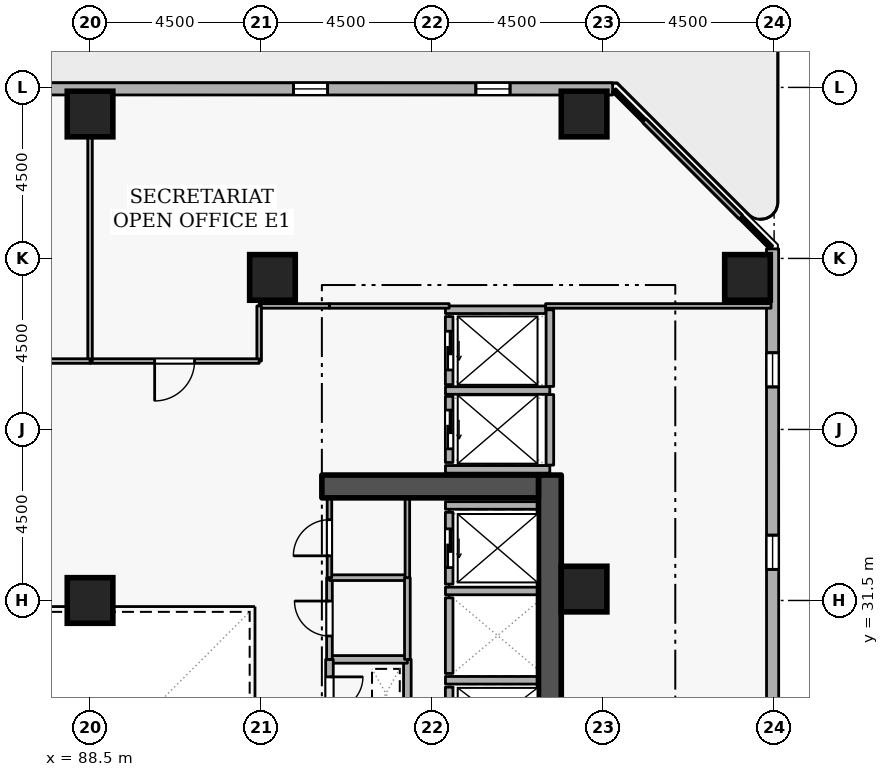
"""IFC4 building model, lengths in metres.
Left out: names, types, materials, properties, quantities, classifications, styles, units other than length and angle.
Written with IfcOpenShell. Run it as: python <this file> out.ifc"""

import sys

from ifc_helpers import new_model, si_unit, direction, frame, frame_2d, origin, origin_2d, place, context, subcontext, project, spatial, rectangle, extrude, element, fill, save


model = new_model("IFC4")
c1 = context("Model", 3, precision=1e-05, world=origin(), true_north=direction((0.0, 1.0)))
c2 = subcontext(c1, "Body", "Model", "MODEL_VIEW")
j1 = project(units=[si_unit("LENGTHUNIT", "METRE"), si_unit("PLANEANGLEUNIT", "RADIAN")], contexts=[c1])
p1 = place(None, origin())
s1 = spatial("IfcSite", under=j1, at=p1, CompositionType="ELEMENT")
p2 = place(p1, origin())
s2 = spatial("IfcBuilding", under=s1, at=p2, CompositionType="ELEMENT")
p3 = place(p2, frame((0.0, 0.0, 98.1)))
s3 = spatial("IfcBuildingStorey", under=s2, at=p3, CompositionType="ELEMENT", Elevation=98.1)
p4 = place(p3, frame((100.6, 19.2, 0.0), z_axis=(0.0, 0.0, 1.0), x_axis=(0.0, 1.0, 0.0)))
e1 = element("IfcWall", 1, at=p4, inside=s3, PredefinedType="SHEAR", context=c2, shape_type="SweptSolid", body=[
    extrude(rectangle(XDim=15.6, YDim=0.6, at=frame_2d((7.8, 0.0))), origin(), (0.0, 0.0, 1.0), 3.6),
])
p5 = place(p3, frame((94.6, 34.5, 0.0), z_axis=(0.0, 0.0, 1.0), x_axis=(1.0, 0.0, 0.0)))
e2 = element("IfcWall", 2, at=p5, inside=s3, PredefinedType="SHEAR", context=c2, shape_type="SweptSolid", body=[
    extrude(rectangle(XDim=5.7, YDim=0.6, at=frame_2d((2.85, 0.0))), origin(), (0.0, 0.0, 1.0), 3.6),
])
for number, where, z_axis, x_axis in (
    (3, (105.8, 40.0, 0.0), (0.0, 0.0, 1.0), (1.0, 0.0, 0.0)),
    (4, (101.5, 44.3, 0.0), (0.0, 0.0, 1.0), (1.0, 0.0, 0.0)),
    (5, (88.5, 44.3, 0.0), (0.0, 0.0, 1.0), (1.0, 0.0, 0.0)),
    (6, (93.3, 40.0, 0.0), (0.0, 0.0, 1.0), (1.0, 0.0, 0.0)),
    (7, (101.5, 31.8, 0.0), (0.0, 0.0, 1.0), (1.0, 0.0, 0.0)),
    (8, (88.5, 31.5, 0.0), (0.0, 0.0, 1.0), (1.0, 0.0, 0.0)),
):
    element("IfcColumn", number, at=place(p3, frame(where, z_axis=z_axis, x_axis=x_axis)), inside=s3, PredefinedType="COLUMN", context=c2, shape_type="SweptSolid", body=[
        extrude(rectangle(XDim=1.2, YDim=1.2, at=origin_2d()), origin(), (0.0, 0.0, 1.0), 3.6),
    ])
p6 = place(p3, frame((106.465, 5.619, 0.0), z_axis=(0.0, 0.0, 1.0), x_axis=(-0.000145929605, 0.999999989352, 0.0)))
e9 = element("IfcWall", 9, at=p6, inside=s3, PredefinedType="STANDARD", context=c2, shape_type="SweptSolid", body=[
    extrude(rectangle(XDim=35.133, YDim=0.32, at=frame_2d((17.566, 0.0))), origin(), (0.0, 0.0, 1.0), 2.7),
])
p7 = place(p6, frame((2.7, 0.0, 0.72)))
e10 = element("IfcOpeningElement", 10, at=p7, cuts=e9, PredefinedType="OPENING", context=c2, shape_type="SweptSolid", body=[
    extrude(rectangle(XDim=0.9, YDim=1.75, at=frame_2d((0.45, 0.875))), frame((0.0, 0.17, 0.0), z_axis=(0.0, -1.0, 0.0), x_axis=(1.0, 0.0, 0.0)), (0.0, 0.0, 1.0), 0.34),
])
p8 = place(p6, frame((12.3, 0.0, 0.72)))
e11 = element("IfcOpeningElement", 11, at=p8, cuts=e9, PredefinedType="OPENING", context=c2, shape_type="SweptSolid", body=[
    extrude(rectangle(XDim=0.9, YDim=1.75, at=frame_2d((0.45, 0.875))), frame((0.0, 0.17, 0.0), z_axis=(0.0, -1.0, 0.0), x_axis=(1.0, 0.0, 0.0)), (0.0, 0.0, 1.0), 0.34),
])
p9 = place(p6, frame((17.1, 0.0, 0.72)))
e12 = element("IfcOpeningElement", 12, at=p9, cuts=e9, PredefinedType="OPENING", context=c2, shape_type="SweptSolid", body=[
    extrude(rectangle(XDim=0.9, YDim=1.75, at=frame_2d((0.45, 0.875))), frame((0.0, 0.17, 0.0), z_axis=(0.0, -1.0, 0.0), x_axis=(1.0, 0.0, 0.0)), (0.0, 0.0, 1.0), 0.34),
])
p10 = place(p6, frame((26.7, 0.0, 0.72)))
e13 = element("IfcOpeningElement", 13, at=p10, cuts=e9, PredefinedType="OPENING", context=c2, shape_type="SweptSolid", body=[
    extrude(rectangle(XDim=0.9, YDim=1.75, at=frame_2d((0.45, 0.875))), frame((0.0, 0.17, 0.0), z_axis=(0.0, -1.0, 0.0), x_axis=(1.0, 0.0, 0.0)), (0.0, 0.0, 1.0), 0.34),
])
p11 = place(p6, frame((31.5, 0.0, 0.72)))
e14 = element("IfcOpeningElement", 14, at=p11, cuts=e9, PredefinedType="OPENING", context=c2, shape_type="SweptSolid", body=[
    extrude(rectangle(XDim=0.9, YDim=1.75, at=frame_2d((0.45, 0.875))), frame((0.0, 0.17, 0.0), z_axis=(0.0, -1.0, 0.0), x_axis=(1.0, 0.0, 0.0)), (0.0, 0.0, 1.0), 0.34),
])
p12 = place(p3, frame((102.252, 44.959, 0.0), z_axis=(0.0, 0.0, 1.0), x_axis=(-0.999999989352, 0.000145929605, 0.0)))
e15 = element("IfcWall", 15, at=p12, inside=s3, PredefinedType="STANDARD", context=c2, shape_type="SweptSolid", body=[
    extrude(rectangle(XDim=35.133, YDim=0.32, at=frame_2d((17.566, 0.0))), origin(), (0.0, 0.0, 1.0), 2.7),
])
p13 = place(p12, frame((19.292, 0.0, 0.0)))
e16 = element("IfcOpeningElement", 16, at=p13, cuts=e15, PredefinedType="OPENING", context=c2, shape_type="SweptSolid", body=[
    extrude(rectangle(XDim=1.15, YDim=2.1, at=frame_2d((0.575, 1.05))), frame((0.0, 0.17, 0.0), z_axis=(0.0, -1.0, 0.0), x_axis=(1.0, 0.0, 0.0)), (0.0, 0.0, 1.0), 0.34),
])
p14 = place(p12, frame((2.7, 0.0, 0.72)))
e17 = element("IfcOpeningElement", 17, at=p14, cuts=e15, PredefinedType="OPENING", context=c2, shape_type="SweptSolid", body=[
    extrude(rectangle(XDim=0.9, YDim=1.75, at=frame_2d((0.45, 0.875))), frame((0.0, 0.17, 0.0), z_axis=(0.0, -1.0, 0.0), x_axis=(1.0, 0.0, 0.0)), (0.0, 0.0, 1.0), 0.34),
])
p15 = place(p12, frame((7.5, 0.0, 0.72)))
e18 = element("IfcOpeningElement", 18, at=p15, cuts=e15, PredefinedType="OPENING", context=c2, shape_type="SweptSolid", body=[
    extrude(rectangle(XDim=0.9, YDim=1.75, at=frame_2d((0.45, 0.875))), frame((0.0, 0.17, 0.0), z_axis=(0.0, -1.0, 0.0), x_axis=(1.0, 0.0, 0.0)), (0.0, 0.0, 1.0), 0.34),
])
p16 = place(p12, frame((17.1, 0.0, 0.72)))
e19 = element("IfcOpeningElement", 19, at=p16, cuts=e15, PredefinedType="OPENING", context=c2, shape_type="SweptSolid", body=[
    extrude(rectangle(XDim=0.9, YDim=1.75, at=frame_2d((0.45, 0.875))), frame((0.0, 0.17, 0.0), z_axis=(0.0, -1.0, 0.0), x_axis=(1.0, 0.0, 0.0)), (0.0, 0.0, 1.0), 0.34),
])
p17 = place(p12, frame((21.9, 0.0, 0.72)))
e20 = element("IfcOpeningElement", 20, at=p17, cuts=e15, PredefinedType="OPENING", context=c2, shape_type="SweptSolid", body=[
    extrude(rectangle(XDim=0.9, YDim=1.75, at=frame_2d((0.45, 0.875))), frame((0.0, 0.17, 0.0), z_axis=(0.0, -1.0, 0.0), x_axis=(1.0, 0.0, 0.0)), (0.0, 0.0, 1.0), 0.34),
])
p18 = place(p12, frame((31.5, 0.0, 0.72)))
e21 = element("IfcOpeningElement", 21, at=p18, cuts=e15, PredefinedType="OPENING", context=c2, shape_type="SweptSolid", body=[
    extrude(rectangle(XDim=0.9, YDim=1.75, at=frame_2d((0.45, 0.875))), frame((0.0, 0.17, 0.0), z_axis=(0.0, -1.0, 0.0), x_axis=(1.0, 0.0, 0.0)), (0.0, 0.0, 1.0), 0.34),
])
p19 = place(p3, frame((97.95, 29.22, 0.0), z_axis=(0.0, 0.0, 1.0), x_axis=(0.0, -1.0, 0.0)))
e22 = element("IfcWall", 22, at=p19, inside=s3, PredefinedType="STANDARD", context=c2, shape_type="SweptSolid", body=[
    extrude(rectangle(XDim=1.64, YDim=0.2, at=frame_2d((0.82, 0.0))), origin(), (0.0, 0.0, 1.0), 3.3),
])
p20 = place(p19, frame((0.31, 0.0, 0.0)))
e23 = element("IfcOpeningElement", 23, at=p20, cuts=e22, PredefinedType="OPENING", context=c2, shape_type="SweptSolid", body=[
    extrude(rectangle(XDim=1.02, YDim=2.06, at=frame_2d((0.51, 1.03))), frame((0.0, 0.11, 0.0), z_axis=(0.0, -1.0, 0.0), x_axis=(1.0, 0.0, 0.0)), (0.0, 0.0, 1.0), 0.22),
])
p21 = place(p3, frame((97.95, 31.57, 0.0), z_axis=(0.0, 0.0, 1.0), x_axis=(0.0, -1.0, 0.0)))
e24 = element("IfcWall", 24, at=p21, inside=s3, PredefinedType="STANDARD", context=c2, shape_type="SweptSolid", body=[
    extrude(rectangle(XDim=1.99, YDim=0.2, at=frame_2d((0.995, 0.0))), origin(), (0.0, 0.0, 1.0), 3.3),
])
p22 = place(p3, frame((97.95, 33.82, 0.0), z_axis=(0.0, 0.0, 1.0), x_axis=(0.0, -1.0, 0.0)))
e25 = element("IfcWall", 25, at=p22, inside=s3, PredefinedType="STANDARD", context=c2, shape_type="SweptSolid", body=[
    extrude(rectangle(XDim=1.89, YDim=0.2, at=frame_2d((0.945, 0.0))), origin(), (0.0, 0.0, 1.0), 3.3),
])
p23 = place(p22, frame((0.435, 0.0, 0.0)))
e26 = element("IfcOpeningElement", 26, at=p23, cuts=e25, PredefinedType="OPENING", context=c2, shape_type="SweptSolid", body=[
    extrude(rectangle(XDim=1.02, YDim=2.06, at=frame_2d((0.51, 1.03))), frame((0.0, 0.11, 0.0), z_axis=(0.0, -1.0, 0.0), x_axis=(1.0, 0.0, 0.0)), (0.0, 0.0, 1.0), 0.22),
])
p24 = place(p3, frame((97.95, 36.87, 0.0), z_axis=(0.0, 0.0, 1.0), x_axis=(0.0, -1.0, 0.0)))
e27 = element("IfcWall", 27, at=p24, inside=s3, PredefinedType="STANDARD", context=c2, shape_type="SweptSolid", body=[
    extrude(rectangle(XDim=1.74, YDim=0.2, at=frame_2d((0.87, 0.0))), origin(), (0.0, 0.0, 1.0), 3.3),
])
p25 = place(p24, frame((0.36, 0.0, 0.0)))
e28 = element("IfcOpeningElement", 28, at=p25, cuts=e27, PredefinedType="OPENING", context=c2, shape_type="SweptSolid", body=[
    extrude(rectangle(XDim=1.02, YDim=2.06, at=frame_2d((0.51, 1.03))), frame((0.0, 0.11, 0.0), z_axis=(0.0, -1.0, 0.0), x_axis=(1.0, 0.0, 0.0)), (0.0, 0.0, 1.0), 0.22),
])
p26 = place(p3, frame((97.95, 38.97, 0.0), z_axis=(0.0, 0.0, 1.0), x_axis=(0.0, -1.0, 0.0)))
e29 = element("IfcWall", 29, at=p26, inside=s3, PredefinedType="STANDARD", context=c2, shape_type="SweptSolid", body=[
    extrude(rectangle(XDim=1.79, YDim=0.2, at=frame_2d((0.895, 0.0))), origin(), (0.0, 0.0, 1.0), 3.3),
])
p27 = place(p26, frame((0.385, 0.0, 0.0)))
e30 = element("IfcOpeningElement", 30, at=p27, cuts=e29, PredefinedType="OPENING", context=c2, shape_type="SweptSolid", body=[
    extrude(rectangle(XDim=1.02, YDim=2.06, at=frame_2d((0.51, 1.03))), frame((0.0, 0.11, 0.0), z_axis=(0.0, -1.0, 0.0), x_axis=(1.0, 0.0, 0.0)), (0.0, 0.0, 1.0), 0.22),
])
for number, where, z_axis, x_axis in (
    (31, (97.852, 29.4, 0.0), (0.0, 0.0, 1.0), (1.0, 0.0, 0.0)),
    (32, (97.852, 31.75, 0.0), (0.0, 0.0, 1.0), (1.0, 0.0, 0.0)),
    (33, (97.852, 34.0, 0.0), (0.0, 0.0, 1.0), (1.0, 0.0, 0.0)),
):
    element("IfcWall", number, at=place(p3, frame(where, z_axis=z_axis, x_axis=x_axis)), inside=s3, PredefinedType="STANDARD", context=c2, shape_type="SweptSolid", body=[
        extrude(rectangle(XDim=2.436, YDim=0.2, at=frame_2d((1.218, 0.0))), origin(), (0.0, 0.0, 1.0), 3.3),
    ])
for number, where, z_axis, x_axis in (
    (34, (97.852, 37.025, 0.0), (0.0, 0.0, 1.0), (1.0, 0.0, 0.0)),
    (35, (97.852, 34.95, 0.0), (0.0, 0.0, 1.0), (1.0, 0.0, 0.0)),
):
    element("IfcWall", number, at=place(p3, frame(where, z_axis=z_axis, x_axis=x_axis)), inside=s3, PredefinedType="STANDARD", context=c2, shape_type="SweptSolid", body=[
        extrude(rectangle(XDim=2.746, YDim=0.2, at=frame_2d((1.373, 0.0))), origin(), (0.0, 0.0, 1.0), 3.3),
    ])
p28 = place(p3, frame((100.6, 35.062, 0.0), z_axis=(0.0, 0.0, 1.0), x_axis=(0.0, 1.0, 0.0)))
e36 = element("IfcWall", 36, at=p28, inside=s3, PredefinedType="STANDARD", context=c2, shape_type="SweptSolid", body=[
    extrude(rectangle(XDim=1.856, YDim=0.2, at=frame_2d((0.928, 0.0))), origin(), (0.0, 0.0, 1.0), 3.3),
])
p29 = place(p3, frame((100.6, 37.132, 0.0), z_axis=(0.0, 0.0, 1.0), x_axis=(0.0, 1.0, 0.0)))
e37 = element("IfcWall", 37, at=p29, inside=s3, PredefinedType="STANDARD", context=c2, shape_type="SweptSolid", body=[
    extrude(rectangle(XDim=2.016, YDim=0.2, at=frame_2d((1.008, 0.0))), origin(), (0.0, 0.0, 1.0), 3.3),
])
p30 = place(p3, frame((97.852, 39.15, 0.0), z_axis=(0.0, 0.0, 1.0), x_axis=(1.0, 0.0, 0.0)))
e38 = element("IfcWall", 38, at=p30, inside=s3, PredefinedType="STANDARD", context=c2, shape_type="SweptSolid", body=[
    extrude(rectangle(XDim=2.636, YDim=0.2, at=frame_2d((1.318, 0.0))), origin(), (0.0, 0.0, 1.0), 3.3),
])
p31 = place(p3, frame((96.85, 28.15, 0.0), z_axis=(0.0, 0.0, 1.0), x_axis=(0.0, 1.0, 0.0)))
e39 = element("IfcWall", 39, at=p31, inside=s3, PredefinedType="STANDARD", context=c2, shape_type="SweptSolid", body=[
    extrude(rectangle(XDim=1.8, YDim=0.2, at=frame_2d((0.9, 0.0))), origin(), (0.0, 0.0, 1.0), 3.3),
])
p32 = place(p3, frame((96.85, 29.95, 0.0), z_axis=(0.0, 0.0, 1.0), x_axis=(-1.0, 0.0, 0.0)))
e40 = element("IfcWall", 40, at=p32, inside=s3, PredefinedType="STANDARD", context=c2, shape_type="SweptSolid", body=[
    extrude(rectangle(XDim=2.05, YDim=0.2, at=frame_2d((1.025, 0.0))), origin(), (0.0, 0.0, 1.0), 3.3),
])
p33 = place(p3, frame((94.8, 29.95, 0.0), z_axis=(0.0, 0.0, 1.0), x_axis=(0.0, -1.0, 0.0)))
e41 = element("IfcWall", 41, at=p33, inside=s3, PredefinedType="STANDARD", context=c2, shape_type="SweptSolid", body=[
    extrude(rectangle(XDim=1.8, YDim=0.2, at=frame_2d((0.9, 0.0))), origin(), (0.0, 0.0, 1.0), 3.3),
])
p34 = place(p33, frame((0.46, 0.0, 0.0)))
e42 = element("IfcOpeningElement", 42, at=p34, cuts=e41, PredefinedType="OPENING", context=c2, shape_type="SweptSolid", body=[
    extrude(rectangle(XDim=0.88, YDim=2.04, at=frame_2d((0.44, 1.02))), frame((0.0, 0.11, 0.0), z_axis=(0.0, -1.0, 0.0), x_axis=(1.0, 0.0, 0.0)), (0.0, 0.0, 1.0), 0.22),
])
p35 = place(p3, frame((94.8, 29.95, 0.0), z_axis=(0.0, 0.0, 1.0), x_axis=(0.0, 1.0, 0.0)))
e43 = element("IfcWall", 43, at=p35, inside=s3, PredefinedType="PARTITIONING", context=c2, shape_type="SweptSolid", body=[
    extrude(rectangle(XDim=2.15, YDim=0.15, at=frame_2d((1.075, 0.0))), origin(), (0.0, 0.0, 1.0), 3.3),
])
p36 = place(p35, frame((0.615, 0.0, 0.0)))
e44 = element("IfcOpeningElement", 44, at=p36, cuts=e43, PredefinedType="OPENING", context=c2, shape_type="SweptSolid", body=[
    extrude(rectangle(XDim=0.92, YDim=2.08, at=frame_2d((0.46, 1.04))), frame((0.0, 0.085, 0.0), z_axis=(0.0, -1.0, 0.0), x_axis=(1.0, 0.0, 0.0)), (0.0, 0.0, 1.0), 0.17),
])
p37 = place(p3, frame((94.8, 32.1, 0.0), z_axis=(0.0, 0.0, 1.0), x_axis=(1.0, 0.0, 0.0)))
e45 = element("IfcWall", 45, at=p37, inside=s3, PredefinedType="PARTITIONING", context=c2, shape_type="SweptSolid", body=[
    extrude(rectangle(XDim=2.05, YDim=0.15, at=frame_2d((1.025, 0.0))), origin(), (0.0, 0.0, 1.0), 3.3),
])
p38 = place(p3, frame((96.85, 32.1, 0.0), z_axis=(0.0, 0.0, 1.0), x_axis=(0.0, -1.0, 0.0)))
e46 = element("IfcWall", 46, at=p38, inside=s3, PredefinedType="PARTITIONING", context=c2, shape_type="SweptSolid", body=[
    extrude(rectangle(XDim=2.15, YDim=0.15, at=frame_2d((1.075, 0.0))), origin(), (0.0, 0.0, 1.0), 3.3),
])
p39 = place(p3, frame((94.8, 32.1, 0.0), z_axis=(0.0, 0.0, 1.0), x_axis=(0.0, 1.0, 0.0)))
e47 = element("IfcWall", 47, at=p39, inside=s3, PredefinedType="PARTITIONING", context=c2, shape_type="SweptSolid", body=[
    extrude(rectangle(XDim=2.1, YDim=0.12, at=frame_2d((1.05, 0.0))), origin(), (0.0, 0.0, 1.0), 3.3),
])
p40 = place(p39, frame((0.575, 0.0, 0.0)))
e48 = element("IfcOpeningElement", 48, at=p40, cuts=e47, PredefinedType="OPENING", context=c2, shape_type="SweptSolid", body=[
    extrude(rectangle(XDim=0.95, YDim=2.1, at=frame_2d((0.475, 1.05))), frame((0.0, 0.07, 0.0), z_axis=(0.0, -1.0, 0.0), x_axis=(1.0, 0.0, 0.0)), (0.0, 0.0, 1.0), 0.14),
])
p41 = place(p3, frame((96.85, 34.2, 0.0), z_axis=(0.0, 0.0, 1.0), x_axis=(0.0, -1.0, 0.0)))
e49 = element("IfcWall", 49, at=p41, inside=s3, PredefinedType="PARTITIONING", context=c2, shape_type="SweptSolid", body=[
    extrude(rectangle(XDim=2.1, YDim=0.12, at=frame_2d((1.05, 0.0))), origin(), (0.0, 0.0, 1.0), 3.3),
])
p42 = place(p3, frame((106.42, 39.25, 0.0), z_axis=(0.0, 0.0, 1.0), x_axis=(-1.0, 0.0, 0.0)))
e50 = element("IfcWall", 50, at=p42, inside=s3, PredefinedType="PARTITIONING", context=c2, shape_type="SweptSolid", body=[
    extrude(rectangle(XDim=5.932, YDim=0.12, at=frame_2d((2.966, 0.0))), origin(), (0.0, 0.0, 1.0), 3.3),
])
p43 = place(p3, frame((97.95, 39.25, 0.0), z_axis=(0.0, 0.0, 1.0), x_axis=(-1.0, 0.0, 0.0)))
e51 = element("IfcWall", 51, at=p43, inside=s3, PredefinedType="PARTITIONING", context=c2, shape_type="SweptSolid", body=[
    extrude(rectangle(XDim=3.15, YDim=0.12, at=frame_2d((1.575, 0.0))), origin(), (0.0, 0.0, 1.0), 3.3),
])
p44 = place(p3, frame((94.8, 39.25, 0.0), z_axis=(0.0, 0.0, 1.0), x_axis=(-1.0, 0.0, 0.0)))
e52 = element("IfcWall", 52, at=p44, inside=s3, PredefinedType="PARTITIONING", context=c2, shape_type="SweptSolid", body=[
    extrude(rectangle(XDim=1.85, YDim=0.12, at=frame_2d((0.925, 0.0))), origin(), (0.0, 0.0, 1.0), 3.3),
])
p45 = place(p3, frame((92.95, 39.25, 0.0), z_axis=(0.0, 0.0, 1.0), x_axis=(0.0, -1.0, 0.0)))
e53 = element("IfcWall", 53, at=p45, inside=s3, PredefinedType="PARTITIONING", context=c2, shape_type="SweptSolid", body=[
    extrude(rectangle(XDim=1.45, YDim=0.12, at=frame_2d((0.725, 0.0))), origin(), (0.0, 0.0, 1.0), 3.3),
])
p46 = place(p3, frame((92.95, 37.8, 0.0), z_axis=(0.0, 0.0, 1.0), x_axis=(-1.0, 0.0, 0.0)))
e54 = element("IfcWall", 54, at=p46, inside=s3, PredefinedType="PARTITIONING", context=c2, shape_type="SweptSolid", body=[
    extrude(rectangle(XDim=4.45, YDim=0.12, at=frame_2d((2.225, 0.0))), origin(), (0.0, 0.0, 1.0), 3.3),
])
p47 = place(p46, frame((1.7, 0.0, 0.0)))
e55 = element("IfcOpeningElement", 55, at=p47, cuts=e54, PredefinedType="OPENING", context=c2, shape_type="SweptSolid", body=[
    extrude(rectangle(XDim=1.05, YDim=2.1, at=frame_2d((0.525, 1.05))), frame((0.0, 0.07, 0.0), z_axis=(0.0, -1.0, 0.0), x_axis=(1.0, 0.0, 0.0)), (0.0, 0.0, 1.0), 0.14),
])
p48 = place(p3, frame((88.5, 37.8, 0.0), z_axis=(0.0, 0.0, 1.0), x_axis=(0.0, 1.0, 0.0)))
e56 = element("IfcWall", 56, at=p48, inside=s3, PredefinedType="PARTITIONING", context=c2, shape_type="SweptSolid", body=[
    extrude(rectangle(XDim=7.12, YDim=0.12, at=frame_2d((3.56, 0.0))), origin(), (0.0, 0.0, 1.0), 2.838),
])
p49 = place(p3, frame((102.289, 44.92, 0.0), z_axis=(0.0, 0.0, 1.0), x_axis=(0.707106781187, -0.707106781187, 0.0)))
e57 = element("IfcWall", 57, at=p49, inside=s3, PredefinedType="PARTITIONING", context=c2, shape_type="SweptSolid", body=[
    extrude(rectangle(XDim=5.842, YDim=0.12, at=frame_2d((2.921, 0.0))), origin(), (0.0, 0.0, 1.0), 3.3),
])
p50 = place(p3, frame((88.5, 37.8, 0.0), z_axis=(0.0, 0.0, 1.0), x_axis=(-1.0, 0.0, 0.0)))
e58 = element("IfcWall", 58, at=p50, inside=s3, PredefinedType="PARTITIONING", context=c2, shape_type="SweptSolid", body=[
    extrude(rectangle(XDim=4.45, YDim=0.12, at=frame_2d((2.225, 0.0))), origin(), (0.0, 0.0, 1.0), 3.3),
])
p51 = place(p10, origin())
e59 = element("IfcWindow", 59, at=p51, inside=s3, PartitioningType="SINGLE_PANEL", PredefinedType="WINDOW", context=c2, shape_type="SweptSolid", body=[
    extrude(rectangle(XDim=0.9, YDim=1.75, at=frame_2d((0.45, 0.875))), frame((0.0, 0.03, 0.0), z_axis=(0.0, -1.0, 0.0), x_axis=(1.0, 0.0, 0.0)), (0.0, 0.0, 1.0), 0.06),
])
fill(e13, e59)
p52 = place(p11, origin())
e60 = element("IfcWindow", 60, at=p52, inside=s3, PartitioningType="SINGLE_PANEL", PredefinedType="WINDOW", context=c2, shape_type="SweptSolid", body=[
    extrude(rectangle(XDim=0.9, YDim=1.75, at=frame_2d((0.45, 0.875))), frame((0.0, 0.03, 0.0), z_axis=(0.0, -1.0, 0.0), x_axis=(1.0, 0.0, 0.0)), (0.0, 0.0, 1.0), 0.06),
])
fill(e14, e60)
p53 = place(p14, origin())
e61 = element("IfcWindow", 61, at=p53, inside=s3, PartitioningType="SINGLE_PANEL", PredefinedType="WINDOW", context=c2, shape_type="SweptSolid", body=[
    extrude(rectangle(XDim=0.9, YDim=1.75, at=frame_2d((0.45, 0.875))), frame((0.0, 0.03, 0.0), z_axis=(0.0, -1.0, 0.0), x_axis=(1.0, 0.0, 0.0)), (0.0, 0.0, 1.0), 0.06),
])
fill(e17, e61)
p54 = place(p15, origin())
e62 = element("IfcWindow", 62, at=p54, inside=s3, PartitioningType="SINGLE_PANEL", PredefinedType="WINDOW", context=c2, shape_type="SweptSolid", body=[
    extrude(rectangle(XDim=0.9, YDim=1.75, at=frame_2d((0.45, 0.875))), frame((0.0, 0.03, 0.0), z_axis=(0.0, -1.0, 0.0), x_axis=(1.0, 0.0, 0.0)), (0.0, 0.0, 1.0), 0.06),
])
fill(e18, e62)
p55 = place(p23, origin())
e63 = element("IfcDoor", 63, at=p55, inside=s3, OperationType="SLIDING_TO_LEFT", PredefinedType="DOOR", context=c2, shape_type="SweptSolid", body=[
    extrude(rectangle(XDim=1.02, YDim=2.06, at=frame_2d((0.51, 1.03))), frame((0.0, 0.025, 0.0), z_axis=(0.0, -1.0, 0.0), x_axis=(1.0, 0.0, 0.0)), (0.0, 0.0, 1.0), 0.05),
])
fill(e26, e63)
p56 = place(p25, origin())
e64 = element("IfcDoor", 64, at=p56, inside=s3, OperationType="SLIDING_TO_LEFT", PredefinedType="DOOR", context=c2, shape_type="SweptSolid", body=[
    extrude(rectangle(XDim=1.02, YDim=2.06, at=frame_2d((0.51, 1.03))), frame((0.0, 0.025, 0.0), z_axis=(0.0, -1.0, 0.0), x_axis=(1.0, 0.0, 0.0)), (0.0, 0.0, 1.0), 0.05),
])
fill(e28, e64)
p57 = place(p27, origin())
e65 = element("IfcDoor", 65, at=p57, inside=s3, OperationType="SLIDING_TO_LEFT", PredefinedType="DOOR", context=c2, shape_type="SweptSolid", body=[
    extrude(rectangle(XDim=1.02, YDim=2.06, at=frame_2d((0.51, 1.03))), frame((0.0, 0.025, 0.0), z_axis=(0.0, -1.0, 0.0), x_axis=(1.0, 0.0, 0.0)), (0.0, 0.0, 1.0), 0.05),
])
fill(e30, e65)
p58 = place(p34, origin())
e66 = element("IfcDoor", 66, at=p58, inside=s3, OperationType="SINGLE_SWING_LEFT", PredefinedType="DOOR", context=c2, shape_type="SweptSolid", body=[
    extrude(rectangle(XDim=0.88, YDim=2.04, at=frame_2d((0.44, 1.02))), frame((0.0, 0.025, 0.0), z_axis=(0.0, -1.0, 0.0), x_axis=(1.0, 0.0, 0.0)), (0.0, 0.0, 1.0), 0.05),
])
fill(e42, e66)
p59 = place(p36, origin())
e67 = element("IfcDoor", 67, at=p59, inside=s3, OperationType="SINGLE_SWING_RIGHT", PredefinedType="DOOR", context=c2, shape_type="SweptSolid", body=[
    extrude(rectangle(XDim=0.92, YDim=2.08, at=frame_2d((0.46, 1.04))), frame((0.0, 0.025, 0.0), z_axis=(0.0, -1.0, 0.0), x_axis=(1.0, 0.0, 0.0)), (0.0, 0.0, 1.0), 0.05),
])
fill(e44, e67)
p60 = place(p40, origin())
e68 = element("IfcDoor", 68, at=p60, inside=s3, OperationType="SINGLE_SWING_LEFT", PredefinedType="DOOR", context=c2, shape_type="SweptSolid", body=[
    extrude(rectangle(XDim=0.95, YDim=2.1, at=frame_2d((0.475, 1.05))), frame((0.0, 0.025, 0.0), z_axis=(0.0, -1.0, 0.0), x_axis=(1.0, 0.0, 0.0)), (0.0, 0.0, 1.0), 0.05),
])
fill(e48, e68)
p61 = place(p47, origin())
e69 = element("IfcDoor", 69, at=p61, inside=s3, OperationType="SINGLE_SWING_RIGHT", PredefinedType="DOOR", context=c2, shape_type="SweptSolid", body=[
    extrude(rectangle(XDim=1.05, YDim=2.1, at=frame_2d((0.525, 1.05))), frame((0.0, 0.025, 0.0), z_axis=(0.0, -1.0, 0.0), x_axis=(1.0, 0.0, 0.0)), (0.0, 0.0, 1.0), 0.05),
])
fill(e55, e69)
save(model, sys.argv[1])
